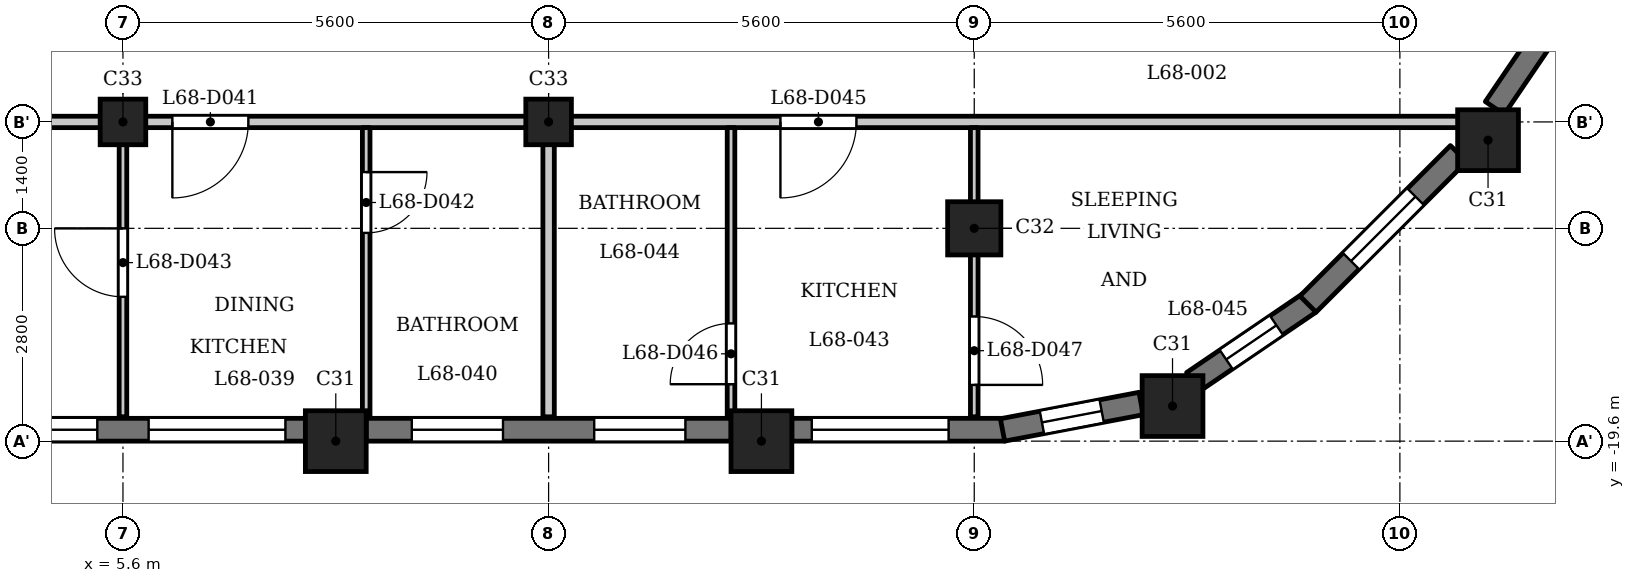
"""IFC4 building model, lengths in metres.
Left out: names, types, materials, properties, quantities, classifications, styles, units other than length and angle.
Written with IfcOpenShell. Run it as: python <this file> out.ifc"""

import sys

from ifc_helpers import new_model, si_unit, direction, frame, frame_2d, origin, origin_2d, place, context, subcontext, project, spatial, rectangle, extrude, element, fill, save


model = new_model("IFC4")
c1 = context("Model", 3, precision=1e-05, world=origin(), true_north=direction((0.0, 1.0)))
c2 = subcontext(c1, "Body", "Model", "MODEL_VIEW")
j1 = project(units=[si_unit("LENGTHUNIT", "METRE"), si_unit("PLANEANGLEUNIT", "RADIAN")], contexts=[c1])
p1 = place(None, origin())
s1 = spatial("IfcSite", under=j1, at=p1, CompositionType="ELEMENT")
p2 = place(p1, origin())
s2 = spatial("IfcBuilding", under=s1, at=p2, CompositionType="ELEMENT")
p3 = place(p2, frame((0.0, 0.0, 262.7)))
s3 = spatial("IfcBuildingStorey", under=s2, at=p3, CompositionType="ELEMENT", Elevation=262.7)
for number, where, z_axis, x_axis in (
    (1, (8.4, -19.6, 0.0), (0.0, 0.0, 1.0), (1.0, 0.0, 0.0)),
    (2, (14.0, -19.6, 0.0), (0.0, 0.0, 1.0), (1.0, 0.0, 0.0)),
    (3, (19.409, -19.138, 0.0), (0.0, 0.0, 1.0), (1.0, 0.0, 0.0)),
    (4, (23.56, -15.64, 0.0), (0.0, 0.0, 1.0), (1.0, 0.0, 0.0)),
):
    element("IfcColumn", number, at=place(p3, frame(where, z_axis=z_axis, x_axis=x_axis)), inside=s3, PredefinedType="COLUMN", context=c2, shape_type="SweptSolid", body=[
        extrude(rectangle(XDim=0.8, YDim=0.8, at=origin_2d()), origin(), (0.0, 0.0, 1.0), 3.5),
    ])
p4 = place(p3, frame((16.8, -16.8, 0.0), z_axis=(0.0, 0.0, 1.0), x_axis=(1.0, 0.0, 0.0)))
e5 = element("IfcColumn", 5, at=p4, inside=s3, PredefinedType="COLUMN", context=c2, shape_type="SweptSolid", body=[
    extrude(rectangle(XDim=0.7, YDim=0.7, at=origin_2d()), origin(), (0.0, 0.0, 1.0), 3.5),
])
for number, where, z_axis, x_axis in (
    (6, (5.6, -15.4, 0.0), (0.0, 0.0, 1.0), (1.0, 0.0, 0.0)),
    (7, (11.2, -15.4, 0.0), (0.0, 0.0, 1.0), (1.0, 0.0, 0.0)),
):
    element("IfcColumn", number, at=place(p3, frame(where, z_axis=z_axis, x_axis=x_axis)), inside=s3, PredefinedType="COLUMN", context=c2, shape_type="SweptSolid", body=[
        extrude(rectangle(XDim=0.6, YDim=0.6, at=origin_2d()), origin(), (0.0, 0.0, 1.0), 3.5),
    ])
p5 = place(p3, frame((3.2, -19.45, 0.0), z_axis=(0.0, 0.0, 1.0), x_axis=(1.0, 0.0, 0.0)))
e8 = element("IfcWall", 8, at=p5, inside=s3, PredefinedType="SOLIDWALL", context=c2, shape_type="SweptSolid", body=[
    extrude(rectangle(XDim=4.8, YDim=0.3, at=frame_2d((2.4, 0.0))), origin(), (0.0, 0.0, 1.0), 2.55),
])
p6 = place(p5, frame((0.262, 0.0, 0.9)))
e9 = element("IfcOpeningElement", 9, at=p6, cuts=e8, PredefinedType="OPENING", context=c2, shape_type="SweptSolid", body=[
    extrude(rectangle(XDim=1.8, YDim=1.25, at=frame_2d((0.9, 0.625))), frame((0.0, 0.16, 0.0), z_axis=(0.0, -1.0, 0.0), x_axis=(1.0, 0.0, 0.0)), (0.0, 0.0, 1.0), 0.32),
])
p7 = place(p5, frame((2.738, 0.0, 0.9)))
e10 = element("IfcOpeningElement", 10, at=p7, cuts=e8, PredefinedType="OPENING", context=c2, shape_type="SweptSolid", body=[
    extrude(rectangle(XDim=1.8, YDim=1.25, at=frame_2d((0.9, 0.625))), frame((0.0, 0.16, 0.0), z_axis=(0.0, -1.0, 0.0), x_axis=(1.0, 0.0, 0.0)), (0.0, 0.0, 1.0), 0.32),
])
p8 = place(p3, frame((8.8, -19.45, 0.0), z_axis=(0.0, 0.0, 1.0), x_axis=(1.0, 0.0, 0.0)))
e11 = element("IfcWall", 11, at=p8, inside=s3, PredefinedType="SOLIDWALL", context=c2, shape_type="SweptSolid", body=[
    extrude(rectangle(XDim=4.8, YDim=0.3, at=frame_2d((2.4, 0.0))), origin(), (0.0, 0.0, 1.0), 2.55),
])
p9 = place(p8, frame((0.6, 0.0, 0.6)))
e12 = element("IfcOpeningElement", 12, at=p9, cuts=e11, PredefinedType="OPENING", context=c2, shape_type="SweptSolid", body=[
    extrude(rectangle(XDim=1.2, YDim=1.55, at=frame_2d((0.6, 0.775))), frame((0.0, 0.16, 0.0), z_axis=(0.0, -1.0, 0.0), x_axis=(1.0, 0.0, 0.0)), (0.0, 0.0, 1.0), 0.32),
])
p10 = place(p8, frame((3.0, 0.0, 0.6)))
e13 = element("IfcOpeningElement", 13, at=p10, cuts=e11, PredefinedType="OPENING", context=c2, shape_type="SweptSolid", body=[
    extrude(rectangle(XDim=1.2, YDim=1.55, at=frame_2d((0.6, 0.775))), frame((0.0, 0.16, 0.0), z_axis=(0.0, -1.0, 0.0), x_axis=(1.0, 0.0, 0.0)), (0.0, 0.0, 1.0), 0.32),
])
p11 = place(p3, frame((14.4, -19.45, 0.0), z_axis=(0.0, 0.0, 1.0), x_axis=(1.0, 0.0, 0.0)))
e14 = element("IfcWall", 14, at=p11, inside=s3, PredefinedType="SOLIDWALL", context=c2, shape_type="SweptSolid", body=[
    extrude(rectangle(XDim=2.8, YDim=0.3, at=frame_2d((1.4, 0.0))), origin(), (0.0, 0.0, 1.0), 2.55),
])
p12 = place(p11, frame((0.262, 0.0, 0.9)))
e15 = element("IfcOpeningElement", 15, at=p12, cuts=e14, PredefinedType="OPENING", context=c2, shape_type="SweptSolid", body=[
    extrude(rectangle(XDim=1.8, YDim=1.25, at=frame_2d((0.9, 0.625))), frame((0.0, 0.16, 0.0), z_axis=(0.0, -1.0, 0.0), x_axis=(1.0, 0.0, 0.0)), (0.0, 0.0, 1.0), 0.32),
])
p13 = place(p3, frame((17.172, -19.453, 0.0), z_axis=(0.0, 0.0, 1.0), x_axis=(0.982301706131, 0.187305520826, 0.0)))
e16 = element("IfcWall", 16, at=p13, inside=s3, PredefinedType="SOLIDWALL", context=c2, shape_type="SweptSolid", body=[
    extrude(rectangle(XDim=1.856, YDim=0.3, at=frame_2d((0.928, 0.0))), origin(), (0.0, 0.0, 1.0), 2.55),
])
p14 = place(p13, frame((0.528, 0.0, 0.6)))
e17 = element("IfcOpeningElement", 17, at=p14, cuts=e16, PredefinedType="OPENING", context=c2, shape_type="SweptSolid", body=[
    extrude(rectangle(XDim=0.8, YDim=1.55, at=frame_2d((0.4, 0.775))), frame((0.0, 0.16, 0.0), z_axis=(0.0, -1.0, 0.0), x_axis=(1.0, 0.0, 0.0)), (0.0, 0.0, 1.0), 0.32),
])
p15 = place(p3, frame((19.678, -18.822, 0.0), z_axis=(0.0, 0.0, 1.0), x_axis=(0.826997446962, 0.562205676526, 0.0)))
e18 = element("IfcWall", 18, at=p15, inside=s3, PredefinedType="SOLIDWALL", context=c2, shape_type="SweptSolid", body=[
    extrude(rectangle(XDim=1.856, YDim=0.3, at=frame_2d((0.928, 0.0))), origin(), (0.0, 0.0, 1.0), 2.55),
])
p16 = place(p15, frame((0.528, 0.0, 0.6)))
e19 = element("IfcOpeningElement", 19, at=p16, cuts=e18, PredefinedType="OPENING", context=c2, shape_type="SweptSolid", body=[
    extrude(rectangle(XDim=0.8, YDim=1.55, at=frame_2d((0.4, 0.775))), frame((0.0, 0.16, 0.0), z_axis=(0.0, -1.0, 0.0), x_axis=(1.0, 0.0, 0.0)), (0.0, 0.0, 1.0), 0.32),
])
p17 = place(p3, frame((21.191, -17.797, 0.0), z_axis=(0.0, 0.0, 1.0), x_axis=(0.707106781187, 0.707106781187, 0.0)))
e20 = element("IfcWall", 20, at=p17, inside=s3, PredefinedType="SOLIDWALL", context=c2, shape_type="SweptSolid", body=[
    extrude(rectangle(XDim=2.8, YDim=0.3, at=frame_2d((1.4, 0.0))), origin(), (0.0, 0.0, 1.0), 2.55),
])
p18 = place(p17, frame((0.8, 0.0, 0.6)))
e21 = element("IfcOpeningElement", 21, at=p18, cuts=e20, PredefinedType="OPENING", context=c2, shape_type="SweptSolid", body=[
    extrude(rectangle(XDim=1.2, YDim=1.55, at=frame_2d((0.6, 0.775))), frame((0.0, 0.16, 0.0), z_axis=(0.0, -1.0, 0.0), x_axis=(1.0, 0.0, 0.0)), (0.0, 0.0, 1.0), 0.32),
])
p19 = place(p3, frame((23.648, -15.217, 0.0), z_axis=(0.0, 0.0, 1.0), x_axis=(0.562043265151, 0.827107833416, 0.0)))
e22 = element("IfcWall", 22, at=p19, inside=s3, PredefinedType="SOLIDWALL", context=c2, shape_type="SweptSolid", body=[
    extrude(rectangle(XDim=1.377, YDim=0.3, at=frame_2d((0.688, 0.0))), origin(), (0.0, 0.0, 1.0), 2.55),
])
p20 = place(p3, frame((-23.322, -15.4, 0.0), z_axis=(0.0, 0.0, 1.0), x_axis=(1.0, 0.0, 0.0)))
e23 = element("IfcWall", 23, at=p20, inside=s3, PredefinedType="PARTITIONING", context=c2, shape_type="SweptSolid", body=[
    extrude(rectangle(XDim=46.872, YDim=0.15, at=frame_2d((23.436, 0.0))), origin(), (0.0, 0.0, 1.0), 3.2),
])
p21 = place(p20, frame((12.772, 0.0, 0.0)))
e24 = element("IfcOpeningElement", 24, at=p21, cuts=e23, PredefinedType="OPENING", context=c2, shape_type="SweptSolid", body=[
    extrude(rectangle(XDim=1.0, YDim=2.1, at=frame_2d((0.5, 1.05))), frame((0.0, 0.085, 0.0), z_axis=(0.0, -1.0, 0.0), x_axis=(1.0, 0.0, 0.0)), (0.0, 0.0, 1.0), 0.17),
])
p22 = place(p20, frame((29.572, 0.0, 0.0)))
e25 = element("IfcOpeningElement", 25, at=p22, cuts=e23, PredefinedType="OPENING", context=c2, shape_type="SweptSolid", body=[
    extrude(rectangle(XDim=1.0, YDim=2.1, at=frame_2d((0.5, 1.05))), frame((0.0, 0.085, 0.0), z_axis=(0.0, -1.0, 0.0), x_axis=(1.0, 0.0, 0.0)), (0.0, 0.0, 1.0), 0.17),
])
p23 = place(p20, frame((37.572, 0.0, 0.0)))
e26 = element("IfcOpeningElement", 26, at=p23, cuts=e23, PredefinedType="OPENING", context=c2, shape_type="SweptSolid", body=[
    extrude(rectangle(XDim=1.0, YDim=2.1, at=frame_2d((0.5, 1.05))), frame((0.0, 0.085, 0.0), z_axis=(0.0, -1.0, 0.0), x_axis=(1.0, 0.0, 0.0)), (0.0, 0.0, 1.0), 0.17),
])
p24 = place(p3, frame((5.6, -19.28, 0.0), z_axis=(0.0, 0.0, 1.0), x_axis=(0.0, 1.0, 0.0)))
e27 = element("IfcWall", 27, at=p24, inside=s3, PredefinedType="PARTITIONING", context=c2, shape_type="SweptSolid", body=[
    extrude(rectangle(XDim=3.805, YDim=0.1, at=frame_2d((1.902, 0.0))), origin(), (0.0, 0.0, 1.0), 3.2),
])
p25 = place(p24, frame((1.579, 0.0, 0.0)))
e28 = element("IfcOpeningElement", 28, at=p25, cuts=e27, PredefinedType="OPENING", context=c2, shape_type="SweptSolid", body=[
    extrude(rectangle(XDim=0.9, YDim=2.1, at=frame_2d((0.45, 1.05))), frame((0.0, 0.06, 0.0), z_axis=(0.0, -1.0, 0.0), x_axis=(1.0, 0.0, 0.0)), (0.0, 0.0, 1.0), 0.12),
])
p26 = place(p3, frame((8.8, -19.28, 0.0), z_axis=(0.0, 0.0, 1.0), x_axis=(0.0, 1.0, 0.0)))
e29 = element("IfcWall", 29, at=p26, inside=s3, PredefinedType="PARTITIONING", context=c2, shape_type="SweptSolid", body=[
    extrude(rectangle(XDim=3.805, YDim=0.1, at=frame_2d((1.902, 0.0))), origin(), (0.0, 0.0, 1.0), 3.2),
])
p27 = place(p26, frame((2.42, 0.0, 0.0)))
e30 = element("IfcOpeningElement", 30, at=p27, cuts=e29, PredefinedType="OPENING", context=c2, shape_type="SweptSolid", body=[
    extrude(rectangle(XDim=0.8, YDim=2.1, at=frame_2d((0.4, 1.05))), frame((0.0, 0.06, 0.0), z_axis=(0.0, -1.0, 0.0), x_axis=(1.0, 0.0, 0.0)), (0.0, 0.0, 1.0), 0.12),
])
p28 = place(p3, frame((11.2, -19.28, 0.0), z_axis=(0.0, 0.0, 1.0), x_axis=(0.0, 1.0, 0.0)))
e31 = element("IfcWall", 31, at=p28, inside=s3, PredefinedType="PARTITIONING", context=c2, shape_type="SweptSolid", body=[
    extrude(rectangle(XDim=3.805, YDim=0.15, at=frame_2d((1.902, 0.0))), origin(), (0.0, 0.0, 1.0), 3.2),
])
p29 = place(p3, frame((13.6, -19.28, 0.0), z_axis=(0.0, 0.0, 1.0), x_axis=(0.0, 1.0, 0.0)))
e32 = element("IfcWall", 32, at=p29, inside=s3, PredefinedType="PARTITIONING", context=c2, shape_type="SweptSolid", body=[
    extrude(rectangle(XDim=3.805, YDim=0.1, at=frame_2d((1.902, 0.0))), origin(), (0.0, 0.0, 1.0), 3.2),
])
p30 = place(p29, frame((0.429, 0.0, 0.0)))
e33 = element("IfcOpeningElement", 33, at=p30, cuts=e32, PredefinedType="OPENING", context=c2, shape_type="SweptSolid", body=[
    extrude(rectangle(XDim=0.8, YDim=2.1, at=frame_2d((0.4, 1.05))), frame((0.0, 0.06, 0.0), z_axis=(0.0, -1.0, 0.0), x_axis=(1.0, 0.0, 0.0)), (0.0, 0.0, 1.0), 0.12),
])
p31 = place(p3, frame((16.8, -19.28, 0.0), z_axis=(0.0, 0.0, 1.0), x_axis=(0.0, 1.0, 0.0)))
e34 = element("IfcWall", 34, at=p31, inside=s3, PredefinedType="PARTITIONING", context=c2, shape_type="SweptSolid", body=[
    extrude(rectangle(XDim=3.805, YDim=0.1, at=frame_2d((1.902, 0.0))), origin(), (0.0, 0.0, 1.0), 3.2),
])
p32 = place(p31, frame((0.42, 0.0, 0.0)))
e35 = element("IfcOpeningElement", 35, at=p32, cuts=e34, PredefinedType="OPENING", context=c2, shape_type="SweptSolid", body=[
    extrude(rectangle(XDim=0.9, YDim=2.1, at=frame_2d((0.45, 1.05))), frame((0.0, 0.06, 0.0), z_axis=(0.0, -1.0, 0.0), x_axis=(1.0, 0.0, 0.0)), (0.0, 0.0, 1.0), 0.12),
])
p33 = place(p22, origin())
e36 = element("IfcDoor", 36, at=p33, inside=s3, OperationType="SINGLE_SWING_LEFT", PredefinedType="DOOR", context=c2, shape_type="SweptSolid", body=[
    extrude(rectangle(XDim=1.0, YDim=2.1, at=frame_2d((0.5, 1.05))), frame((0.0, 0.025, 0.0), z_axis=(0.0, -1.0, 0.0), x_axis=(1.0, 0.0, 0.0)), (0.0, 0.0, 1.0), 0.05),
])
fill(e25, e36)
p34 = place(p27, origin())
e37 = element("IfcDoor", 37, at=p34, inside=s3, OperationType="SINGLE_SWING_RIGHT", PredefinedType="DOOR", context=c2, shape_type="SweptSolid", body=[
    extrude(rectangle(XDim=0.8, YDim=2.1, at=frame_2d((0.4, 1.05))), frame((0.0, 0.025, 0.0), z_axis=(0.0, -1.0, 0.0), x_axis=(1.0, 0.0, 0.0)), (0.0, 0.0, 1.0), 0.05),
])
fill(e30, e37)
p35 = place(p25, origin())
e38 = element("IfcDoor", 38, at=p35, inside=s3, OperationType="SINGLE_SWING_LEFT", PredefinedType="DOOR", context=c2, shape_type="SweptSolid", body=[
    extrude(rectangle(XDim=0.9, YDim=2.1, at=frame_2d((0.45, 1.05))), frame((0.0, 0.025, 0.0), z_axis=(0.0, -1.0, 0.0), x_axis=(1.0, 0.0, 0.0)), (0.0, 0.0, 1.0), 0.05),
])
fill(e28, e38)
p36 = place(p23, origin())
e39 = element("IfcDoor", 39, at=p36, inside=s3, OperationType="SINGLE_SWING_LEFT", PredefinedType="DOOR", context=c2, shape_type="SweptSolid", body=[
    extrude(rectangle(XDim=1.0, YDim=2.1, at=frame_2d((0.5, 1.05))), frame((0.0, 0.025, 0.0), z_axis=(0.0, -1.0, 0.0), x_axis=(1.0, 0.0, 0.0)), (0.0, 0.0, 1.0), 0.05),
])
fill(e26, e39)
p37 = place(p30, origin())
e40 = element("IfcDoor", 40, at=p37, inside=s3, OperationType="SINGLE_SWING_RIGHT", PredefinedType="DOOR", context=c2, shape_type="SweptSolid", body=[
    extrude(rectangle(XDim=0.8, YDim=2.1, at=frame_2d((0.4, 1.05))), frame((0.0, 0.025, 0.0), z_axis=(0.0, -1.0, 0.0), x_axis=(1.0, 0.0, 0.0)), (0.0, 0.0, 1.0), 0.05),
])
fill(e33, e40)
p38 = place(p32, origin())
e41 = element("IfcDoor", 41, at=p38, inside=s3, OperationType="SINGLE_SWING_LEFT", PredefinedType="DOOR", context=c2, shape_type="SweptSolid", body=[
    extrude(rectangle(XDim=0.9, YDim=2.1, at=frame_2d((0.45, 1.05))), frame((0.0, 0.025, 0.0), z_axis=(0.0, -1.0, 0.0), x_axis=(1.0, 0.0, 0.0)), (0.0, 0.0, 1.0), 0.05),
])
fill(e35, e41)
p39 = place(p6, origin())
e42 = element("IfcWindow", 42, at=p39, inside=s3, PartitioningType="SINGLE_PANEL", PredefinedType="WINDOW", context=c2, shape_type="SweptSolid", body=[
    extrude(rectangle(XDim=1.8, YDim=1.25, at=frame_2d((0.9, 0.625))), frame((0.0, 0.03, 0.0), z_axis=(0.0, -1.0, 0.0), x_axis=(1.0, 0.0, 0.0)), (0.0, 0.0, 1.0), 0.06),
])
fill(e9, e42)
p40 = place(p7, origin())
e43 = element("IfcWindow", 43, at=p40, inside=s3, PartitioningType="SINGLE_PANEL", PredefinedType="WINDOW", context=c2, shape_type="SweptSolid", body=[
    extrude(rectangle(XDim=1.8, YDim=1.25, at=frame_2d((0.9, 0.625))), frame((0.0, 0.03, 0.0), z_axis=(0.0, -1.0, 0.0), x_axis=(1.0, 0.0, 0.0)), (0.0, 0.0, 1.0), 0.06),
])
fill(e10, e43)
p41 = place(p9, origin())
e44 = element("IfcWindow", 44, at=p41, inside=s3, PartitioningType="SINGLE_PANEL", PredefinedType="WINDOW", context=c2, shape_type="SweptSolid", body=[
    extrude(rectangle(XDim=1.2, YDim=1.55, at=frame_2d((0.6, 0.775))), frame((0.0, 0.03, 0.0), z_axis=(0.0, -1.0, 0.0), x_axis=(1.0, 0.0, 0.0)), (0.0, 0.0, 1.0), 0.06),
])
fill(e12, e44)
p42 = place(p10, origin())
e45 = element("IfcWindow", 45, at=p42, inside=s3, PartitioningType="SINGLE_PANEL", PredefinedType="WINDOW", context=c2, shape_type="SweptSolid", body=[
    extrude(rectangle(XDim=1.2, YDim=1.55, at=frame_2d((0.6, 0.775))), frame((0.0, 0.03, 0.0), z_axis=(0.0, -1.0, 0.0), x_axis=(1.0, 0.0, 0.0)), (0.0, 0.0, 1.0), 0.06),
])
fill(e13, e45)
p43 = place(p12, origin())
e46 = element("IfcWindow", 46, at=p43, inside=s3, PartitioningType="SINGLE_PANEL", PredefinedType="WINDOW", context=c2, shape_type="SweptSolid", body=[
    extrude(rectangle(XDim=1.8, YDim=1.25, at=frame_2d((0.9, 0.625))), frame((0.0, 0.03, 0.0), z_axis=(0.0, -1.0, 0.0), x_axis=(1.0, 0.0, 0.0)), (0.0, 0.0, 1.0), 0.06),
])
fill(e15, e46)
p44 = place(p14, origin())
e47 = element("IfcWindow", 47, at=p44, inside=s3, PartitioningType="SINGLE_PANEL", PredefinedType="WINDOW", context=c2, shape_type="SweptSolid", body=[
    extrude(rectangle(XDim=0.8, YDim=1.55, at=frame_2d((0.4, 0.775))), frame((0.0, 0.03, 0.0), z_axis=(0.0, -1.0, 0.0), x_axis=(1.0, 0.0, 0.0)), (0.0, 0.0, 1.0), 0.06),
])
fill(e17, e47)
p45 = place(p16, origin())
e48 = element("IfcWindow", 48, at=p45, inside=s3, PartitioningType="SINGLE_PANEL", PredefinedType="WINDOW", context=c2, shape_type="SweptSolid", body=[
    extrude(rectangle(XDim=0.8, YDim=1.55, at=frame_2d((0.4, 0.775))), frame((0.0, 0.03, 0.0), z_axis=(0.0, -1.0, 0.0), x_axis=(1.0, 0.0, 0.0)), (0.0, 0.0, 1.0), 0.06),
])
fill(e19, e48)
p46 = place(p18, origin())
e49 = element("IfcWindow", 49, at=p46, inside=s3, PartitioningType="SINGLE_PANEL", PredefinedType="WINDOW", context=c2, shape_type="SweptSolid", body=[
    extrude(rectangle(XDim=1.2, YDim=1.55, at=frame_2d((0.6, 0.775))), frame((0.0, 0.03, 0.0), z_axis=(0.0, -1.0, 0.0), x_axis=(1.0, 0.0, 0.0)), (0.0, 0.0, 1.0), 0.06),
])
fill(e21, e49)
save(model, sys.argv[1])
